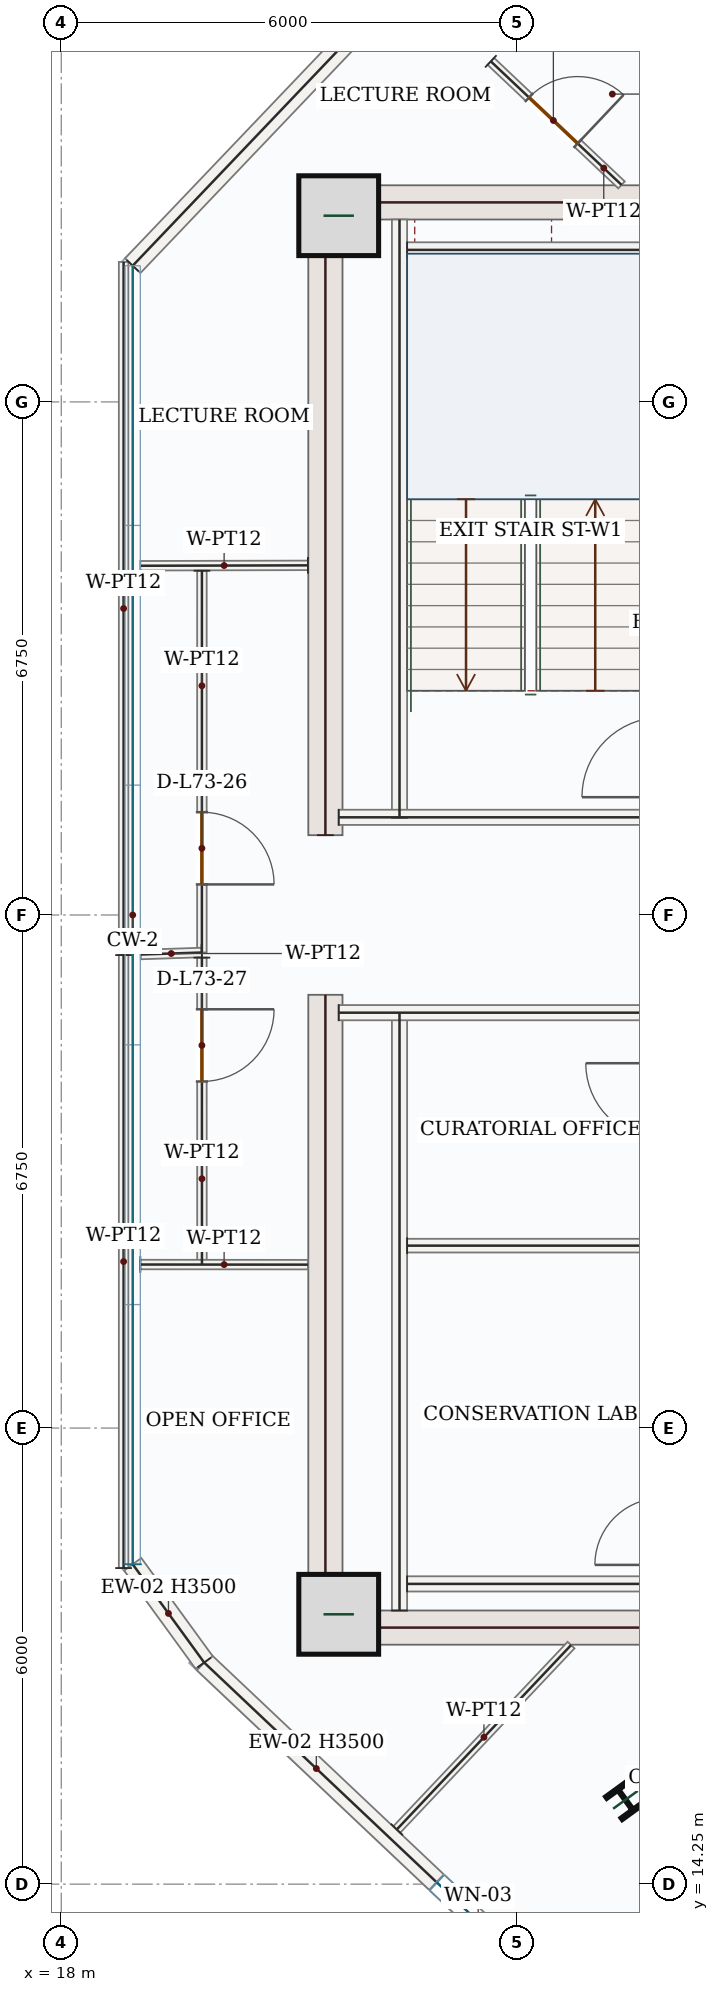
"""IFC4 building model, lengths in metres.
Left out: names, types, materials, properties, quantities, classifications, styles, units other than length and angle.
Written with IfcOpenShell. Run it as: python <this file> out.ifc"""

import sys

from ifc_helpers import new_model, si_unit, direction, frame, frame_2d, origin, origin_2d, place, context, subcontext, project, spatial, rectangle, i_section, extrude, source, transform, mapped, element, fill, save


model = new_model("IFC4")
c1 = context("Model", 3, precision=1e-05, world=origin(), true_north=direction((0.0, 1.0)))
c2 = subcontext(c1, "Body", "Model", "MODEL_VIEW")
j1 = project(units=[si_unit("LENGTHUNIT", "METRE"), si_unit("PLANEANGLEUNIT", "RADIAN")], contexts=[c1])
p1 = place(None, origin())
s1 = spatial("IfcSite", under=j1, at=p1, CompositionType="ELEMENT")
p2 = place(p1, origin())
s2 = spatial("IfcBuilding", under=s1, at=p2, CompositionType="ELEMENT")
p3 = place(p2, frame((0.0, 0.0, 302.85)))
s3 = spatial("IfcBuildingStorey", under=s2, at=p3, CompositionType="ELEMENT", Elevation=302.85)
m1 = source(origin(), c2, "Body", "SweptSolid", [
    extrude(rectangle(XDim=8.55, YDim=0.45, at=frame_2d((4.275, 0.0))), origin(), (0.0, 0.0, 1.0), 3.5),
])
for number, where, z_axis, x_axis in (
    (1, (21.475, 17.4, 0.0), (0.0, 0.0, 1.0), (0.0, 1.0, 0.0)),
    (2, (21.475, 28.05, 0.0), (0.0, 0.0, 1.0), (0.0, 1.0, 0.0)),
):
    element("IfcWall", number, at=place(p3, frame(where, z_axis=z_axis, x_axis=x_axis)), inside=s3, PredefinedType="SHEAR", context=c2, shape_type="MappedRepresentation", body=[
        mapped(m1, transform((0.0, 0.0, 0.0), x_axis=(1.0, 0.0, 0.0), y_axis=(0.0, 1.0, 0.0), z_axis=(0.0, 0.0, 1.0), scale=1.0)),
    ])
m2 = source(origin(), c2, "Body", "SweptSolid", [
    extrude(rectangle(XDim=7.1, YDim=0.45, at=frame_2d((3.55, 0.0))), origin(), (0.0, 0.0, 1.0), 3.5),
])
for number, where, z_axis, x_axis in (
    (3, (21.7, 17.625, 0.0), (0.0, 0.0, 1.0), (1.0, 0.0, 0.0)),
    (4, (21.7, 36.375, 0.0), (0.0, 0.0, 1.0), (1.0, 0.0, 0.0)),
):
    element("IfcWall", number, at=place(p3, frame(where, z_axis=z_axis, x_axis=x_axis)), inside=s3, PredefinedType="SHEAR", context=c2, shape_type="MappedRepresentation", body=[
        mapped(m2, transform((0.0, 0.0, 0.0), x_axis=(1.0, 0.0, 0.0), y_axis=(0.0, 1.0, 0.0), z_axis=(0.0, 0.0, 1.0), scale=1.0)),
    ])
m3 = source(origin(), c2, "Body", "SweptSolid", [
    extrude(rectangle(XDim=1.05, YDim=1.05, at=origin_2d()), origin(), (0.0, 0.0, 1.0), 3.75),
])
for number, where, z_axis, x_axis in (
    (5, (21.65, 17.8, 0.0), (0.0, 0.0, 1.0), (1.0, 0.0, 0.0)),
    (6, (21.65, 36.2, 0.0), (0.0, 0.0, 1.0), (1.0, 0.0, 0.0)),
):
    element("IfcColumn", number, at=place(p3, frame(where, z_axis=z_axis, x_axis=x_axis)), inside=s3, PredefinedType="COLUMN", context=c2, shape_type="MappedRepresentation", body=[
        mapped(m3, transform((0.0, 0.0, 0.0), x_axis=(1.0, 0.0, 0.0), y_axis=(0.0, 1.0, 0.0), z_axis=(0.0, 0.0, 1.0), scale=1.0)),
    ])
m4 = source(origin(), c2, "Body", "SweptSolid", [
    extrude(i_section(OverallWidth=0.374, OverallDepth=0.372, WebThickness=0.016, FlangeThickness=0.026, FilletRadius=0.018, at=origin_2d()), origin(), (0.0, 0.0, 1.0), 3.75),
])
p4 = place(p3, frame((25.422, 15.359, 0.0), z_axis=(0.0, 0.0, 1.0), x_axis=(0.809016994375, 0.587785252292, 0.0)))
e7 = element("IfcColumn", 7, at=p4, inside=s3, PredefinedType="COLUMN", context=c2, shape_type="MappedRepresentation", body=[
    mapped(m4, transform((0.0, 0.0, 0.0), x_axis=(1.0, 0.0, 0.0), y_axis=(0.0, 1.0, 0.0), z_axis=(0.0, 0.0, 1.0), scale=1.0)),
])
p5 = place(p3, frame((27.09, 10.351, 0.0), z_axis=(0.0, 0.0, 1.0), x_axis=(-0.726772856404, 0.686877875022, 0.0)))
e8 = element("IfcWall", 8, at=p5, inside=s3, PredefinedType="SOLIDWALL", context=c2, shape_type="SweptSolid", body=[
    extrude(rectangle(XDim=9.92, YDim=0.28, at=frame_2d((4.96, 0.0))), origin(), (0.0, 0.0, 1.0), 3.5),
])
p6 = place(p5, frame((4.21, 0.0, 0.85)))
e9 = element("IfcOpeningElement", 9, at=p6, cuts=e8, PredefinedType="OPENING", context=c2, shape_type="SweptSolid", body=[
    extrude(rectangle(XDim=1.5, YDim=1.5, at=frame_2d((0.75, 0.75))), frame((0.0, 0.15, 0.0), z_axis=(0.0, -1.0, 0.0), x_axis=(1.0, 0.0, 0.0)), (0.0, 0.0, 1.0), 0.3),
])
m5 = source(origin(), c2, "Body", "SweptSolid", [
    extrude(rectangle(XDim=1.599, YDim=0.28, at=frame_2d((0.799, 0.0))), origin(), (0.0, 0.0, 1.0), 3.5),
])
p7 = place(p3, frame((19.88, 17.165, 0.0), z_axis=(0.0, 0.0, 1.0), x_axis=(-0.58820801539, 0.808709670173, 0.0)))
e10 = element("IfcWall", 10, at=p7, inside=s3, PredefinedType="SOLIDWALL", context=c2, shape_type="MappedRepresentation", body=[
    mapped(m5, transform((0.0, 0.0, 0.0), x_axis=(1.0, 0.0, 0.0), y_axis=(0.0, 1.0, 0.0), z_axis=(0.0, 0.0, 1.0), scale=1.0)),
])
m6 = source(origin(), c2, "Body", "SweptSolid", [
    extrude(rectangle(XDim=10.47, YDim=0.28, at=frame_2d((5.235, 0.0))), origin(), (0.0, 0.0, 1.0), 3.5),
])
p8 = place(p3, frame((18.94, 35.542, 0.0), z_axis=(0.0, 0.0, 1.0), x_axis=(0.690070788875, 0.723741878256, 0.0)))
e11 = element("IfcWall", 11, at=p8, inside=s3, PredefinedType="SOLIDWALL", context=c2, shape_type="MappedRepresentation", body=[
    mapped(m6, transform((0.0, 0.0, 0.0), x_axis=(1.0, 0.0, 0.0), y_axis=(0.0, 1.0, 0.0), z_axis=(0.0, 0.0, 1.0), scale=1.0)),
])
m7 = source(origin(), c2, "Body", "SweptSolid", [
    extrude(rectangle(XDim=7.87, YDim=0.2, at=frame_2d((3.935, 0.0))), origin(), (0.0, 0.0, 1.0), 3.5),
])
for number, where, z_axis, x_axis in (
    (12, (22.45, 17.85, 0.0), (0.0, 0.0, 1.0), (0.0, 1.0, 0.0)),
    (13, (22.45, 28.28, 0.0), (0.0, 0.0, 1.0), (0.0, 1.0, 0.0)),
):
    element("IfcWall", number, at=place(p3, frame(where, z_axis=z_axis, x_axis=x_axis)), inside=s3, PredefinedType="SOLIDWALL", context=c2, shape_type="MappedRepresentation", body=[
        mapped(m7, transform((0.0, 0.0, 0.0), x_axis=(1.0, 0.0, 0.0), y_axis=(0.0, 1.0, 0.0), z_axis=(0.0, 0.0, 1.0), scale=1.0)),
    ])
m8 = source(origin(), c2, "Body", "SweptSolid", [
    extrude(rectangle(XDim=4.25, YDim=0.2, at=frame_2d((2.125, 0.0))), origin(), (0.0, 0.0, 1.0), 3.5),
])
for number, where, z_axis, x_axis in (
    (14, (21.65, 25.715, 0.0), (0.0, 0.0, 1.0), (1.0, 0.0, 0.0)),
    (15, (21.65, 28.285, 0.0), (0.0, 0.0, 1.0), (1.0, 0.0, 0.0)),
):
    element("IfcWall", number, at=place(p3, frame(where, z_axis=z_axis, x_axis=x_axis)), inside=s3, PredefinedType="SOLIDWALL", context=c2, shape_type="MappedRepresentation", body=[
        mapped(m8, transform((0.0, 0.0, 0.0), x_axis=(1.0, 0.0, 0.0), y_axis=(0.0, 1.0, 0.0), z_axis=(0.0, 0.0, 1.0), scale=1.0)),
    ])
m9 = source(origin(), c2, "Body", "SweptSolid", [
    extrude(rectangle(XDim=3.25, YDim=0.2, at=frame_2d((1.625, 0.0))), origin(), (0.0, 0.0, 1.0), 3.5),
])
for number, where, z_axis, x_axis in (
    (16, (22.55, 35.75, 0.0), (0.0, 0.0, 1.0), (1.0, 0.0, 0.0)),
    (17, (22.55, 18.2, 0.0), (0.0, 0.0, 1.0), (1.0, 0.0, 0.0)),
):
    element("IfcWall", number, at=place(p3, frame(where, z_axis=z_axis, x_axis=x_axis)), inside=s3, PredefinedType="SOLIDWALL", context=c2, shape_type="MappedRepresentation", body=[
        mapped(m9, transform((0.0, 0.0, 0.0), x_axis=(1.0, 0.0, 0.0), y_axis=(0.0, 1.0, 0.0), z_axis=(0.0, 0.0, 1.0), scale=1.0)),
    ])
m10 = source(origin(), c2, "Body", "SweptSolid", [
    extrude(rectangle(XDim=3.25, YDim=0.18, at=frame_2d((1.625, 0.0))), origin(), (0.0, 0.0, 1.0), 3.5),
])
p9 = place(p3, frame((22.55, 22.65, 0.0), z_axis=(0.0, 0.0, 1.0), x_axis=(1.0, 0.0, 0.0)))
e18 = element("IfcWall", 18, at=p9, inside=s3, PredefinedType="PARTITIONING", context=c2, shape_type="MappedRepresentation", body=[
    mapped(m10, transform((0.0, 0.0, 0.0), x_axis=(1.0, 0.0, 0.0), y_axis=(0.0, 1.0, 0.0), z_axis=(0.0, 0.0, 1.0), scale=1.0)),
])
p10 = place(p3, frame((23.651, 38.231, 0.0), z_axis=(0.0, 0.0, 1.0), x_axis=(0.726735597886, -0.686917295433, 0.0)))
e19 = element("IfcWall", 19, at=p10, inside=s3, PredefinedType="PARTITIONING", context=c2, shape_type="SweptSolid", body=[
    extrude(rectangle(XDim=2.367, YDim=0.125, at=frame_2d((1.183, 0.0))), origin(), (0.0, 0.0, 1.0), 3.5),
])
p11 = place(p10, frame((0.692, 0.0, 0.0)))
e20 = element("IfcOpeningElement", 20, at=p11, cuts=e19, PredefinedType="OPENING", context=c2, shape_type="SweptSolid", body=[
    extrude(rectangle(XDim=0.88, YDim=2.1, at=frame_2d((0.44, 1.05))), frame((0.0, 0.073, 0.0), z_axis=(0.0, -1.0, 0.0), x_axis=(1.0, 0.0, 0.0)), (0.0, 0.0, 1.0), 0.145),
])
p12 = place(p3, frame((24.456, 41.117, 0.0), z_axis=(0.0, 0.0, 1.0), x_axis=(0.726761082497, -0.686890332562, 0.0)))
e21 = element("IfcWall", 21, at=p12, inside=s3, PredefinedType="PARTITIONING", context=c2, shape_type="SweptSolid", body=[
    extrude(rectangle(XDim=5.964, YDim=0.125, at=frame_2d((2.982, 0.0))), origin(), (0.0, 0.0, 1.0), 3.5),
])
p13 = place(p12, frame((1.103, 0.0, 0.0)))
e22 = element("IfcOpeningElement", 22, at=p13, cuts=e21, PredefinedType="OPENING", context=c2, shape_type="SweptSolid", body=[
    extrude(rectangle(XDim=0.95, YDim=2.15, at=frame_2d((0.475, 1.075))), frame((0.0, 0.073, 0.0), z_axis=(0.0, -1.0, 0.0), x_axis=(1.0, 0.0, 0.0)), (0.0, 0.0, 1.0), 0.145),
])
m11 = source(origin(), c2, "Body", "SweptSolid", [
    extrude(rectangle(XDim=2.205, YDim=0.125, at=frame_2d((1.103, 0.0))), origin(), (0.0, 0.0, 1.0), 3.5),
])
p14 = place(p3, frame((21.245, 31.6, 0.0), z_axis=(0.0, 0.0, 1.0), x_axis=(-0.999997033492, -0.002435776654, 0.0)))
e23 = element("IfcWall", 23, at=p14, inside=s3, PredefinedType="PARTITIONING", context=c2, shape_type="MappedRepresentation", body=[
    mapped(m11, transform((0.0, 0.0, 0.0), x_axis=(1.0, 0.0, 0.0), y_axis=(0.0, 1.0, 0.0), z_axis=(0.0, 0.0, 1.0), scale=1.0)),
])
p15 = place(p3, frame((19.851, 31.529, 0.0), z_axis=(0.0, 0.0, 1.0), x_axis=(-9.7219521e-05, -0.999999995274, 0.0)))
e24 = element("IfcWall", 24, at=p15, inside=s3, PredefinedType="PARTITIONING", context=c2, shape_type="SweptSolid", body=[
    extrude(rectangle(XDim=5.022, YDim=0.125, at=frame_2d((2.511, 0.0))), origin(), (0.0, 0.0, 1.0), 3.5),
])
p16 = place(p15, frame((3.177, 0.0, 0.0)))
e25 = element("IfcOpeningElement", 25, at=p16, cuts=e24, PredefinedType="OPENING", context=c2, shape_type="SweptSolid", body=[
    extrude(rectangle(XDim=0.95, YDim=2.15, at=frame_2d((0.475, 1.075))), frame((0.0, 0.073, 0.0), z_axis=(0.0, -1.0, 0.0), x_axis=(1.0, 0.0, 0.0)), (0.0, 0.0, 1.0), 0.145),
])
m12 = source(origin(), c2, "Body", "SweptSolid", [
    extrude(rectangle(XDim=0.804, YDim=0.125, at=frame_2d((0.402, 0.0))), origin(), (0.0, 0.0, 1.0), 3.5),
])
p17 = place(p3, frame((19.849, 26.507, 0.0), z_axis=(0.0, 0.0, 1.0), x_axis=(-0.999452627665, -0.03308239794, 0.0)))
e26 = element("IfcWall", 26, at=p17, inside=s3, PredefinedType="PARTITIONING", context=c2, shape_type="MappedRepresentation", body=[
    mapped(m12, transform((0.0, 0.0, 0.0), x_axis=(1.0, 0.0, 0.0), y_axis=(0.0, 1.0, 0.0), z_axis=(0.0, 0.0, 1.0), scale=1.0)),
])
m13 = source(origin(), c2, "Body", "SweptSolid", [
    extrude(rectangle(XDim=9.119, YDim=0.125, at=frame_2d((4.56, 0.0))), origin(), (0.0, 0.0, 1.0), 3.5),
])
p18 = place(p3, frame((18.82, 26.473, 0.0), z_axis=(0.0, 0.0, 1.0), x_axis=(0.0, 1.0, 0.0)))
e27 = element("IfcWall", 27, at=p18, inside=s3, PredefinedType="PARTITIONING", context=c2, shape_type="MappedRepresentation", body=[
    mapped(m13, transform((0.0, 0.0, 0.0), x_axis=(1.0, 0.0, 0.0), y_axis=(0.0, 1.0, 0.0), z_axis=(0.0, 0.0, 1.0), scale=1.0)),
])
m14 = source(origin(), c2, "Body", "SweptSolid", [
    extrude(rectangle(XDim=3.337, YDim=0.125, at=frame_2d((1.669, 0.0))), origin(), (0.0, 0.0, 1.0), 3.5),
])
p19 = place(p3, frame((22.415, 14.969, 0.0), z_axis=(0.0, 0.0, 1.0), x_axis=(0.686891986515, 0.726759519278, 0.0)))
e28 = element("IfcWall", 28, at=p19, inside=s3, PredefinedType="PARTITIONING", context=c2, shape_type="MappedRepresentation", body=[
    mapped(m14, transform((0.0, 0.0, 0.0), x_axis=(1.0, 0.0, 0.0), y_axis=(0.0, 1.0, 0.0), z_axis=(0.0, 0.0, 1.0), scale=1.0)),
])
p20 = place(p3, frame((29.328, 16.694, 0.0), z_axis=(0.0, 0.0, 1.0), x_axis=(-0.686871949206, -0.726778456886, 0.0)))
e29 = element("IfcWall", 29, at=p20, inside=s3, PredefinedType="PARTITIONING", context=c2, shape_type="SweptSolid", body=[
    extrude(rectangle(XDim=6.001, YDim=0.125, at=frame_2d((3.001, 0.0))), origin(), (0.0, 0.0, 1.0), 3.5),
])
p21 = place(p20, frame((1.768, 0.0, 0.0)))
e30 = element("IfcOpeningElement", 30, at=p21, cuts=e29, PredefinedType="OPENING", context=c2, shape_type="SweptSolid", body=[
    extrude(rectangle(XDim=0.95, YDim=2.15, at=frame_2d((0.475, 1.075))), frame((0.0, 0.073, 0.0), z_axis=(0.0, -1.0, 0.0), x_axis=(1.0, 0.0, 0.0)), (0.0, 0.0, 1.0), 0.145),
])
p22 = place(p3, frame((19.85, 26.439, 0.0), z_axis=(0.0, 0.0, 1.0), x_axis=(0.000241837961, -0.999999970757, 0.0)))
e31 = element("IfcWall", 31, at=p22, inside=s3, PredefinedType="PARTITIONING", context=c2, shape_type="SweptSolid", body=[
    extrude(rectangle(XDim=4.038, YDim=0.125, at=frame_2d((2.019, 0.0))), origin(), (0.0, 0.0, 1.0), 3.5),
])
p23 = place(p22, frame((0.679, 0.0, 0.0)))
e32 = element("IfcOpeningElement", 32, at=p23, cuts=e31, PredefinedType="OPENING", context=c2, shape_type="SweptSolid", body=[
    extrude(rectangle(XDim=0.95, YDim=2.15, at=frame_2d((0.475, 1.075))), frame((0.0, 0.073, 0.0), z_axis=(0.0, -1.0, 0.0), x_axis=(1.0, 0.0, 0.0)), (0.0, 0.0, 1.0), 0.145),
])
p24 = place(p3, frame((19.04, 22.402, 0.0), z_axis=(0.0, 0.0, 1.0), x_axis=(0.99999969967, -0.000775021911, 0.0)))
e33 = element("IfcWall", 33, at=p24, inside=s3, PredefinedType="PARTITIONING", context=c2, shape_type="MappedRepresentation", body=[
    mapped(m11, transform((0.0, 0.0, 0.0), x_axis=(1.0, 0.0, 0.0), y_axis=(0.0, 1.0, 0.0), z_axis=(0.0, 0.0, 1.0), scale=1.0)),
])
m15 = source(origin(), c2, "Body", "SweptSolid", [
    extrude(rectangle(XDim=8.064, YDim=0.125, at=frame_2d((4.032, 0.0))), origin(), (0.0, 0.0, 1.0), 3.5),
])
p25 = place(p3, frame((18.82, 18.408, 0.0), z_axis=(0.0, 0.0, 1.0), x_axis=(0.0, 1.0, 0.0)))
e34 = element("IfcWall", 34, at=p25, inside=s3, PredefinedType="PARTITIONING", context=c2, shape_type="MappedRepresentation", body=[
    mapped(m15, transform((0.0, 0.0, 0.0), x_axis=(1.0, 0.0, 0.0), y_axis=(0.0, 1.0, 0.0), z_axis=(0.0, 0.0, 1.0), scale=1.0)),
])
m16 = source(origin(), c2, "Body", "SweptSolid", [
    extrude(rectangle(XDim=1.5, YDim=1.5, at=frame_2d((0.75, 0.75))), frame((0.0, 0.03, 0.0), z_axis=(0.0, -1.0, 0.0), x_axis=(1.0, 0.0, 0.0)), (0.0, 0.0, 1.0), 0.06),
])
p26 = place(p6, origin())
e35 = element("IfcWindow", 35, at=p26, inside=s3, PartitioningType="SINGLE_PANEL", PredefinedType="WINDOW", context=c2, shape_type="MappedRepresentation", body=[
    mapped(m16, transform((0.0, 0.0, 0.0), x_axis=(1.0, 0.0, 0.0), y_axis=(0.0, 1.0, 0.0), z_axis=(0.0, 0.0, 1.0), scale=1.0)),
])
fill(e9, e35)
m17 = source(origin(), c2, "Body", "SweptSolid", [
    extrude(rectangle(XDim=0.95, YDim=2.15, at=frame_2d((0.475, 1.075))), frame((0.0, 0.025, 0.0), z_axis=(0.0, -1.0, 0.0), x_axis=(1.0, 0.0, 0.0)), (0.0, 0.0, 1.0), 0.05),
])
p27 = place(p16, origin())
e36 = element("IfcDoor", 36, at=p27, inside=s3, OperationType="SINGLE_SWING_RIGHT", PredefinedType="DOOR", context=c2, shape_type="MappedRepresentation", body=[
    mapped(m17, transform((0.0, 0.0, 0.0), x_axis=(1.0, 0.0, 0.0), y_axis=(0.0, 1.0, 0.0), z_axis=(0.0, 0.0, 1.0), scale=1.0)),
])
fill(e25, e36)
p28 = place(p23, origin())
e37 = element("IfcDoor", 37, at=p28, inside=s3, OperationType="SINGLE_SWING_LEFT", PredefinedType="DOOR", context=c2, shape_type="MappedRepresentation", body=[
    mapped(m17, transform((0.0, 0.0, 0.0), x_axis=(1.0, 0.0, 0.0), y_axis=(0.0, 1.0, 0.0), z_axis=(0.0, 0.0, 1.0), scale=1.0)),
])
fill(e32, e37)
m18 = source(origin(), c2, "Body", "SweptSolid", [
    extrude(rectangle(XDim=0.88, YDim=2.1, at=frame_2d((0.44, 1.05))), frame((0.0, 0.025, 0.0), z_axis=(0.0, -1.0, 0.0), x_axis=(1.0, 0.0, 0.0)), (0.0, 0.0, 1.0), 0.05),
])
p29 = place(p11, origin())
e38 = element("IfcDoor", 38, at=p29, inside=s3, OperationType="SINGLE_SWING_RIGHT", PredefinedType="DOOR", context=c2, shape_type="MappedRepresentation", body=[
    mapped(m18, transform((0.0, 0.0, 0.0), x_axis=(1.0, 0.0, 0.0), y_axis=(0.0, 1.0, 0.0), z_axis=(0.0, 0.0, 1.0), scale=1.0)),
])
fill(e20, e38)
save(model, sys.argv[1])
